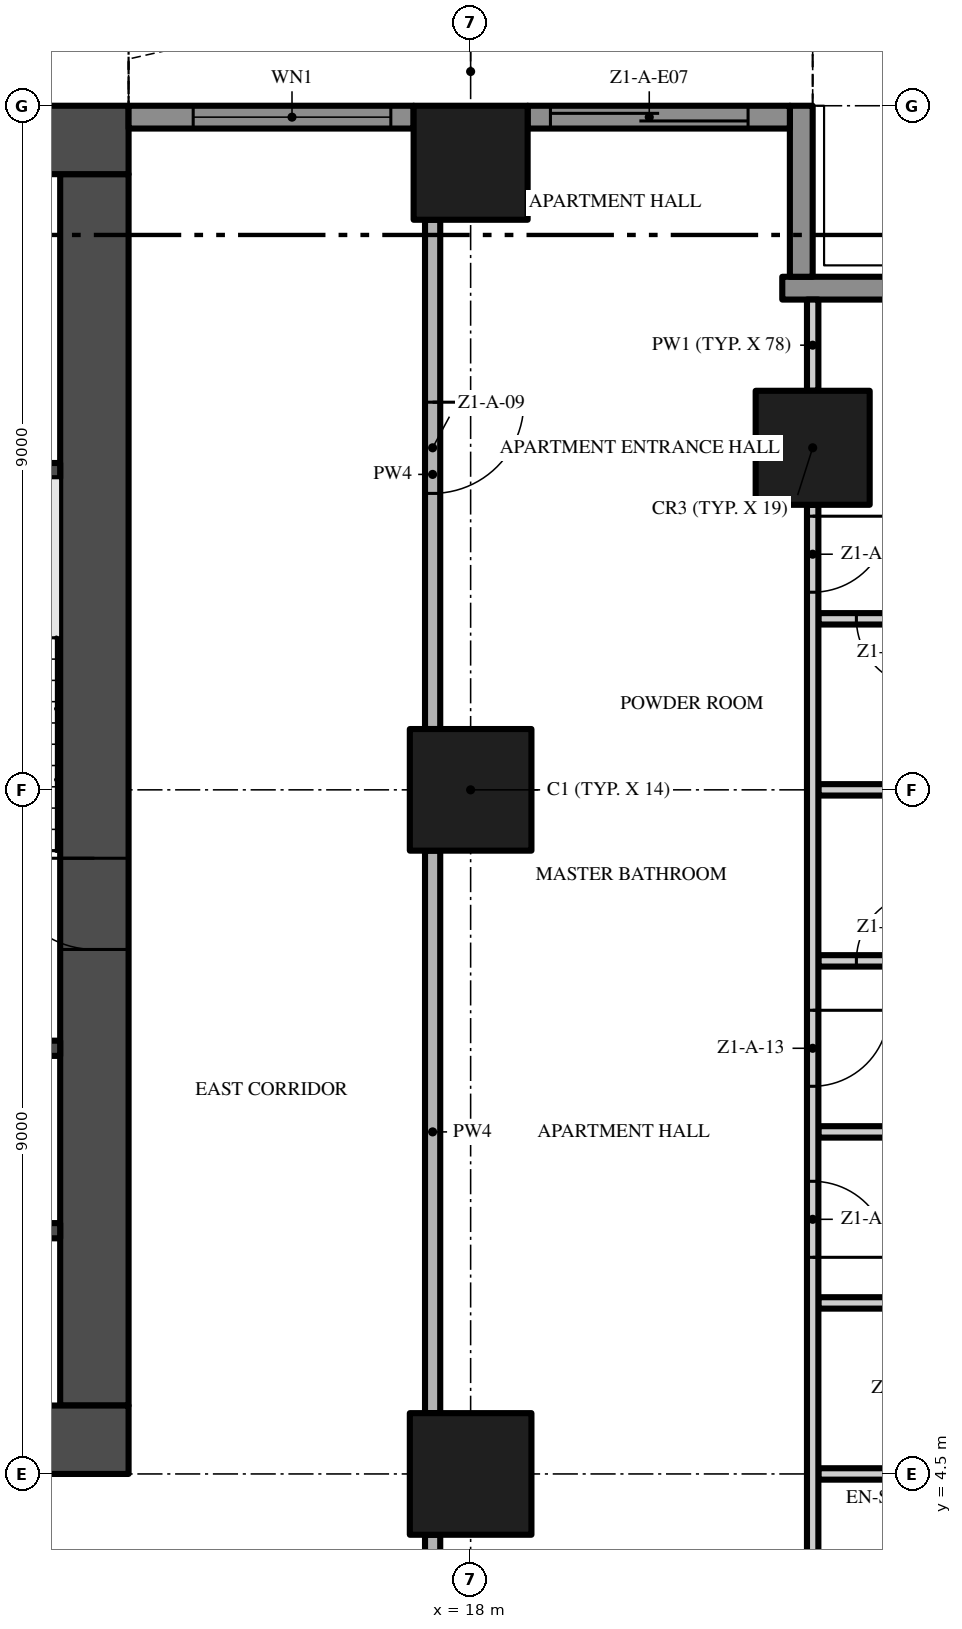
"""IFC4 building model, lengths in metres.
Left out: names, types, materials, properties, quantities, classifications, styles, units other than length and angle.
Written with IfcOpenShell. Run it as: python <this file> out.ifc"""

import sys

from ifc_helpers import new_model, si_unit, direction, frame, frame_2d, origin, origin_2d, place, context, subcontext, project, spatial, polyline, rectangle, outline, extrude, element, fill, save


model = new_model("IFC4")
c1 = context("Model", 3, precision=1e-05, world=origin(), true_north=direction((0.0, 1.0)))
c2 = subcontext(c1, "Body", "Model", "MODEL_VIEW")
j1 = project(units=[si_unit("LENGTHUNIT", "METRE"), si_unit("PLANEANGLEUNIT", "RADIAN")], contexts=[c1])
p1 = place(None, origin())
s1 = spatial("IfcSite", under=j1, at=p1, CompositionType="ELEMENT")
p2 = place(p1, origin())
s2 = spatial("IfcBuilding", under=s1, at=p2, CompositionType="ELEMENT")
p3 = place(p2, frame((0.0, 0.0, 18.8)))
s3 = spatial("IfcBuildingStorey", under=s2, at=p3, CompositionType="ELEMENT", Elevation=18.8)
p4 = place(p3, frame((-13.5, 4.95, -0.3), z_axis=(0.0, 0.0, 1.0), x_axis=(1.0, 0.0, 0.0)))
e1 = element("IfcWall", 1, at=p4, inside=s3, PredefinedType="SHEAR", context=c2, shape_type="SweptSolid", body=[
    extrude(rectangle(XDim=27.0, YDim=0.9, at=frame_2d((13.5, 0.0))), origin(), (0.0, 0.0, 1.0), 3.8),
])
p5 = place(p4, frame((12.0, 0.0, 0.3)))
e2 = element("IfcOpeningElement", 2, at=p5, cuts=e1, PredefinedType="OPENING", context=c2, shape_type="SweptSolid", body=[
    extrude(rectangle(XDim=3.0, YDim=2.4, at=frame_2d((1.5, 1.2))), frame((0.0, 0.46, 0.0), z_axis=(0.0, -1.0, 0.0), x_axis=(1.0, 0.0, 0.0)), (0.0, 0.0, 1.0), 0.92),
])
p6 = place(p4, frame((4.9, 0.0, 0.3)))
e3 = element("IfcOpeningElement", 3, at=p6, cuts=e1, PredefinedType="OPENING", context=c2, shape_type="SweptSolid", body=[
    extrude(rectangle(XDim=1.2, YDim=2.2, at=frame_2d((0.6, 1.1))), frame((0.0, 0.46, 0.0), z_axis=(0.0, -1.0, 0.0), x_axis=(1.0, 0.0, 0.0)), (0.0, 0.0, 1.0), 0.92),
])
p7 = place(p4, frame((20.75, 0.0, 0.3)))
e4 = element("IfcOpeningElement", 4, at=p7, cuts=e1, PredefinedType="OPENING", context=c2, shape_type="SweptSolid", body=[
    extrude(rectangle(XDim=1.5, YDim=2.2, at=frame_2d((0.75, 1.1))), frame((0.0, 0.46, 0.0), z_axis=(0.0, -1.0, 0.0), x_axis=(1.0, 0.0, 0.0)), (0.0, 0.0, 1.0), 0.92),
])
p8 = place(p4, frame((17.4, 0.0, 0.3)))
e5 = element("IfcOpeningElement", 5, at=p8, cuts=e1, PredefinedType="OPENING", context=c2, shape_type="SweptSolid", body=[
    extrude(rectangle(XDim=1.2, YDim=2.2, at=frame_2d((0.6, 1.1))), frame((0.0, 0.46, 0.0), z_axis=(0.0, -1.0, 0.0), x_axis=(1.0, 0.0, 0.0)), (0.0, 0.0, 1.0), 0.92),
])
p9 = place(p3, frame((13.05, 5.4, -0.3), z_axis=(0.0, 0.0, 1.0), x_axis=(0.0, 1.0, 0.0)))
e6 = element("IfcWall", 6, at=p9, inside=s3, PredefinedType="SHEAR", context=c2, shape_type="SweptSolid", body=[
    extrude(rectangle(XDim=16.2, YDim=0.9, at=frame_2d((8.1, 0.0))), origin(), (0.0, 0.0, 1.0), 3.8),
])
p10 = place(p9, frame((6.0, 0.0, 0.3)))
e7 = element("IfcOpeningElement", 7, at=p10, cuts=e6, PredefinedType="OPENING", context=c2, shape_type="SweptSolid", body=[
    extrude(rectangle(XDim=1.2, YDim=2.2, at=frame_2d((0.6, 1.1))), frame((0.0, 0.46, 0.0), z_axis=(0.0, -1.0, 0.0), x_axis=(1.0, 0.0, 0.0)), (0.0, 0.0, 1.0), 0.92),
])
p11 = place(p3, frame((13.5, 22.05, -0.3), z_axis=(0.0, 0.0, 1.0), x_axis=(-1.0, 0.0, 0.0)))
e8 = element("IfcWall", 8, at=p11, inside=s3, PredefinedType="SHEAR", context=c2, shape_type="SweptSolid", body=[
    extrude(rectangle(XDim=27.0, YDim=0.9, at=frame_2d((13.5, 0.0))), origin(), (0.0, 0.0, 1.0), 3.8),
])
p12 = place(p3, frame((18.0, 13.5, 0.0), z_axis=(0.0, 0.0, 1.0), x_axis=(1.0, 0.0, 0.0)))
e9 = element("IfcColumn", 9, at=p12, inside=s3, PredefinedType="COLUMN", context=c2, shape_type="SweptSolid", body=[
    extrude(rectangle(XDim=1.6, YDim=1.6, at=origin_2d()), origin(), (0.0, 0.0, 1.0), 3.5),
])
p13 = place(p3, frame((18.0, 21.75, 0.0), z_axis=(0.0, 0.0, 1.0), x_axis=(1.0, 0.0, 0.0)))
e10 = element("IfcColumn", 10, at=p13, inside=s3, PredefinedType="COLUMN", context=c2, shape_type="SweptSolid", body=[
    extrude(rectangle(XDim=1.5, YDim=1.5, at=origin_2d()), origin(), (0.0, 0.0, 1.0), 3.5),
])
p14 = place(p3, frame((18.0, 4.5, 0.0), z_axis=(0.0, 0.0, 1.0), x_axis=(1.0, 0.0, 0.0)))
e11 = element("IfcColumn", 11, at=p14, inside=s3, PredefinedType="COLUMN", context=c2, shape_type="SweptSolid", body=[
    extrude(rectangle(XDim=1.6, YDim=1.6, at=origin_2d()), origin(), (0.0, 0.0, 1.0), 3.5),
])
p15 = place(p3, frame((22.5, 18.0, 0.0), z_axis=(0.0, 0.0, 1.0), x_axis=(1.0, 0.0, 0.0)))
e12 = element("IfcColumn", 12, at=p15, inside=s3, PredefinedType="COLUMN", context=c2, shape_type="SweptSolid", body=[
    extrude(rectangle(XDim=1.5, YDim=1.5, at=origin_2d()), origin(), (0.0, 0.0, 1.0), 3.5),
])
p16 = place(p3, frame((22.1, 20.1, 0.0), z_axis=(0.0, 0.0, 1.0), x_axis=(1.0, 0.0, 0.0)))
e13 = element("IfcWall", 13, at=p16, inside=s3, PredefinedType="SOLIDWALL", context=c2, shape_type="SweptSolid", body=[
    extrude(rectangle(XDim=2.35, YDim=0.3, at=frame_2d((1.175, 0.0))), origin(), (0.0, 0.0, 1.0), 3.5),
])
p17 = place(p3, frame((22.35, 22.5, 0.0), z_axis=(0.0, 0.0, 1.0), x_axis=(0.0, -1.0, 0.0)))
e14 = element("IfcWall", 14, at=p17, inside=s3, PredefinedType="SOLIDWALL", context=c2, shape_type="SweptSolid", body=[
    extrude(rectangle(XDim=2.25, YDim=0.3, at=frame_2d((1.125, 0.0))), origin(), (0.0, 0.0, 1.0), 3.5),
])
p18 = place(p3, frame((18.75, 22.35, 0.0), z_axis=(0.0, 0.0, 1.0), x_axis=(1.0, 0.0, 0.0)))
e15 = element("IfcWall", 15, at=p18, inside=s3, PredefinedType="SOLIDWALL", context=c2, shape_type="SweptSolid", body=[
    extrude(rectangle(XDim=3.45, YDim=0.3, at=frame_2d((1.725, 0.0))), origin(), (0.0, 0.0, 1.0), 3.5),
])
p19 = place(p18, frame((0.3, 0.0, 0.0)))
e16 = element("IfcOpeningElement", 16, at=p19, cuts=e15, PredefinedType="OPENING", context=c2, shape_type="SweptSolid", body=[
    extrude(rectangle(XDim=2.6, YDim=2.4, at=frame_2d((1.3, 1.2))), frame((0.0, 0.16, 0.0), z_axis=(0.0, -1.0, 0.0), x_axis=(1.0, 0.0, 0.0)), (0.0, 0.0, 1.0), 0.32),
])
p20 = place(p3, frame((13.5, 22.35, 0.0), z_axis=(0.0, 0.0, 1.0), x_axis=(1.0, 0.0, 0.0)))
e17 = element("IfcWall", 17, at=p20, inside=s3, PredefinedType="SOLIDWALL", context=c2, shape_type="SweptSolid", body=[
    extrude(rectangle(XDim=3.75, YDim=0.3, at=frame_2d((1.875, 0.0))), origin(), (0.0, 0.0, 1.0), 3.5),
])
p21 = place(p20, frame((0.85, 0.0, 0.45)))
e18 = element("IfcOpeningElement", 18, at=p21, cuts=e17, PredefinedType="OPENING", context=c2, shape_type="SweptSolid", body=[
    extrude(rectangle(XDim=2.6, YDim=2.65, at=frame_2d((1.3, 1.325))), frame((0.0, 0.16, 0.0), z_axis=(0.0, -1.0, 0.0), x_axis=(1.0, 0.0, 0.0)), (0.0, 0.0, 1.0), 0.32),
])
p22 = place(p3, origin())
e19 = element("IfcWall", 19, at=p22, inside=s3, PredefinedType="USERDEFINED", context=c2, shape_type="SweptSolid", body=[
    extrude(outline(polyline([(22.5, 25.149), (21.0, 25.485), (20.625, 25.5), (19.5, 25.369), (18.0, 24.845), (16.5, 24.112), (15.0, 23.451), (13.5, 23.115), (13.555, 22.871), (15.079, 23.213), (16.605, 23.885), (18.096, 24.614), (19.556, 25.124), (20.635, 25.249), (20.967, 25.236), (22.445, 24.905), (22.5, 25.149)])), origin(), (0.0, 0.0, 1.0), 0.9),
])
for number, where, z_axis, x_axis in (
    (20, (9.65, 7.7, 0.0), (0.0, 0.0, 1.0), (1.0, 0.0, 0.0)),
    (21, (9.65, 10.1, 0.0), (0.0, 0.0, 1.0), (1.0, 0.0, 0.0)),
    (22, (9.65, 17.7, 0.0), (0.0, 0.0, 1.0), (1.0, 0.0, 0.0)),
):
    element("IfcWall", number, at=place(p3, frame(where, z_axis=z_axis, x_axis=x_axis)), inside=s3, PredefinedType="SHEAR", context=c2, shape_type="SweptSolid", body=[
        extrude(rectangle(XDim=2.95, YDim=0.2, at=frame_2d((1.475, 0.0))), origin(), (0.0, 0.0, 1.0), 3.5),
    ])
p23 = place(p3, frame((22.575, 4.5, 0.0), z_axis=(0.0, 0.0, 1.0), x_axis=(1.0, 0.0, 0.0)))
e23 = element("IfcWall", 23, at=p23, inside=s3, PredefinedType="PARTITIONING", context=c2, shape_type="SweptSolid", body=[
    extrude(rectangle(XDim=2.925, YDim=0.15, at=frame_2d((1.462, 0.0))), origin(), (0.0, 0.0, 1.0), 3.5),
])
p24 = place(p3, frame((22.575, 6.75, 0.0), z_axis=(0.0, 0.0, 1.0), x_axis=(1.0, 0.0, 0.0)))
e24 = element("IfcWall", 24, at=p24, inside=s3, PredefinedType="PARTITIONING", context=c2, shape_type="SweptSolid", body=[
    extrude(rectangle(XDim=1.875, YDim=0.15, at=frame_2d((0.938, 0.0))), origin(), (0.0, 0.0, 1.0), 3.5),
])
p25 = place(p3, frame((22.575, 9.0, 0.0), z_axis=(0.0, 0.0, 1.0), x_axis=(1.0, 0.0, 0.0)))
e25 = element("IfcWall", 25, at=p25, inside=s3, PredefinedType="PARTITIONING", context=c2, shape_type="SweptSolid", body=[
    extrude(rectangle(XDim=4.125, YDim=0.15, at=frame_2d((2.062, 0.0))), origin(), (0.0, 0.0, 1.0), 3.5),
])
p26 = place(p3, frame((22.575, 11.25, 0.0), z_axis=(0.0, 0.0, 1.0), x_axis=(1.0, 0.0, 0.0)))
e26 = element("IfcWall", 26, at=p26, inside=s3, PredefinedType="PARTITIONING", context=c2, shape_type="SweptSolid", body=[
    extrude(rectangle(XDim=1.875, YDim=0.15, at=frame_2d((0.938, 0.0))), origin(), (0.0, 0.0, 1.0), 3.5),
])
p27 = place(p26, frame((0.5, 0.0, 0.0)))
e27 = element("IfcOpeningElement", 27, at=p27, cuts=e26, PredefinedType="OPENING", context=c2, shape_type="SweptSolid", body=[
    extrude(rectangle(XDim=0.9, YDim=2.1, at=frame_2d((0.45, 1.05))), frame((0.0, 0.085, 0.0), z_axis=(0.0, -1.0, 0.0), x_axis=(1.0, 0.0, 0.0)), (0.0, 0.0, 1.0), 0.17),
])
p28 = place(p3, frame((22.575, 13.5, 0.0), z_axis=(0.0, 0.0, 1.0), x_axis=(1.0, 0.0, 0.0)))
e28 = element("IfcWall", 28, at=p28, inside=s3, PredefinedType="PARTITIONING", context=c2, shape_type="SweptSolid", body=[
    extrude(rectangle(XDim=1.875, YDim=0.15, at=frame_2d((0.938, 0.0))), origin(), (0.0, 0.0, 1.0), 3.5),
])
p29 = place(p3, frame((24.45, 15.75, 0.0), z_axis=(0.0, 0.0, 1.0), x_axis=(-1.0, 0.0, 0.0)))
e29 = element("IfcWall", 29, at=p29, inside=s3, PredefinedType="PARTITIONING", context=c2, shape_type="SweptSolid", body=[
    extrude(rectangle(XDim=1.875, YDim=0.15, at=frame_2d((0.938, 0.0))), origin(), (0.0, 0.0, 1.0), 3.5),
])
p30 = place(p29, frame((0.475, 0.0, 0.0)))
e30 = element("IfcOpeningElement", 30, at=p30, cuts=e29, PredefinedType="OPENING", context=c2, shape_type="SweptSolid", body=[
    extrude(rectangle(XDim=0.9, YDim=2.1, at=frame_2d((0.45, 1.05))), frame((0.0, 0.085, 0.0), z_axis=(0.0, -1.0, 0.0), x_axis=(1.0, 0.0, 0.0)), (0.0, 0.0, 1.0), 0.17),
])
p31 = place(p3, frame((17.5, -0.2, 0.0), z_axis=(0.0, 0.0, 1.0), x_axis=(0.0, 1.0, 0.0)))
e31 = element("IfcWall", 31, at=p31, inside=s3, PredefinedType="PARTITIONING", context=c2, shape_type="SweptSolid", body=[
    extrude(rectangle(XDim=3.9, YDim=0.2, at=frame_2d((1.95, 0.0))), origin(), (0.0, 0.0, 1.0), 3.5),
])
p32 = place(p3, frame((17.5, 5.3, 0.0), z_axis=(0.0, 0.0, 1.0), x_axis=(0.0, 1.0, 0.0)))
e32 = element("IfcWall", 32, at=p32, inside=s3, PredefinedType="PARTITIONING", context=c2, shape_type="SweptSolid", body=[
    extrude(rectangle(XDim=7.4, YDim=0.2, at=frame_2d((3.7, 0.0))), origin(), (0.0, 0.0, 1.0), 3.5),
])
p33 = place(p3, frame((17.5, 21.0, 0.0), z_axis=(0.0, 0.0, 1.0), x_axis=(0.0, -1.0, 0.0)))
e33 = element("IfcWall", 33, at=p33, inside=s3, PredefinedType="PARTITIONING", context=c2, shape_type="SweptSolid", body=[
    extrude(rectangle(XDim=6.7, YDim=0.2, at=frame_2d((3.35, 0.0))), origin(), (0.0, 0.0, 1.0), 3.5),
])
p34 = place(p33, frame((2.4, 0.0, 0.0)))
e34 = element("IfcOpeningElement", 34, at=p34, cuts=e33, PredefinedType="OPENING", context=c2, shape_type="SweptSolid", body=[
    extrude(rectangle(XDim=1.2, YDim=2.4, at=frame_2d((0.6, 1.2))), frame((0.0, 0.11, 0.0), z_axis=(0.0, -1.0, 0.0), x_axis=(1.0, 0.0, 0.0)), (0.0, 0.0, 1.0), 0.22),
])
p35 = place(p3, frame((22.5, 17.25, 0.0), z_axis=(0.0, 0.0, 1.0), x_axis=(0.0, -1.0, 0.0)))
e35 = element("IfcWall", 35, at=p35, inside=s3, PredefinedType="PARTITIONING", context=c2, shape_type="SweptSolid", body=[
    extrude(rectangle(XDim=17.15, YDim=0.15, at=frame_2d((8.575, 0.0))), origin(), (0.0, 0.0, 1.0), 3.5),
])
p36 = place(p35, frame((14.5, 0.0, 0.0)))
e36 = element("IfcOpeningElement", 36, at=p36, cuts=e35, PredefinedType="OPENING", context=c2, shape_type="SweptSolid", body=[
    extrude(rectangle(XDim=1.0, YDim=2.4, at=frame_2d((0.5, 1.2))), frame((0.0, 0.085, 0.0), z_axis=(0.0, -1.0, 0.0), x_axis=(1.0, 0.0, 0.0)), (0.0, 0.0, 1.0), 0.17),
])
p37 = place(p35, frame((8.9, 0.0, 0.0)))
e37 = element("IfcOpeningElement", 37, at=p37, cuts=e35, PredefinedType="OPENING", context=c2, shape_type="SweptSolid", body=[
    extrude(rectangle(XDim=1.0, YDim=2.4, at=frame_2d((0.5, 1.2))), frame((0.0, 0.085, 0.0), z_axis=(0.0, -1.0, 0.0), x_axis=(1.0, 0.0, 0.0)), (0.0, 0.0, 1.0), 0.17),
])
p38 = place(p35, frame((6.65, 0.0, 0.0)))
e38 = element("IfcOpeningElement", 38, at=p38, cuts=e35, PredefinedType="OPENING", context=c2, shape_type="SweptSolid", body=[
    extrude(rectangle(XDim=1.0, YDim=2.4, at=frame_2d((0.5, 1.2))), frame((0.0, 0.085, 0.0), z_axis=(0.0, -1.0, 0.0), x_axis=(1.0, 0.0, 0.0)), (0.0, 0.0, 1.0), 0.17),
])
p39 = place(p35, frame((0.15, 0.0, 0.0)))
e39 = element("IfcOpeningElement", 39, at=p39, cuts=e35, PredefinedType="OPENING", context=c2, shape_type="SweptSolid", body=[
    extrude(rectangle(XDim=1.0, YDim=2.4, at=frame_2d((0.5, 1.2))), frame((0.0, 0.085, 0.0), z_axis=(0.0, -1.0, 0.0), x_axis=(1.0, 0.0, 0.0)), (0.0, 0.0, 1.0), 0.17),
])
p40 = place(p3, frame((22.5, 18.75, 0.0), z_axis=(0.0, 0.0, 1.0), x_axis=(0.0, 1.0, 0.0)))
e40 = element("IfcWall", 40, at=p40, inside=s3, PredefinedType="PARTITIONING", context=c2, shape_type="SweptSolid", body=[
    extrude(rectangle(XDim=1.2, YDim=0.15, at=frame_2d((0.6, 0.0))), origin(), (0.0, 0.0, 1.0), 3.5),
])
p41 = place(p19, origin())
e41 = element("IfcDoor", 41, at=p41, inside=s3, OperationType="SINGLE_SWING_LEFT", PredefinedType="DOOR", context=c2, shape_type="SweptSolid", body=[
    extrude(rectangle(XDim=2.6, YDim=2.4, at=frame_2d((1.3, 1.2))), frame((0.0, 0.025, 0.0), z_axis=(0.0, -1.0, 0.0), x_axis=(1.0, 0.0, 0.0)), (0.0, 0.0, 1.0), 0.05),
])
fill(e16, e41)
p42 = place(p21, origin())
e42 = element("IfcWindow", 42, at=p42, inside=s3, PartitioningType="SINGLE_PANEL", PredefinedType="WINDOW", context=c2, shape_type="SweptSolid", body=[
    extrude(rectangle(XDim=2.6, YDim=2.65, at=frame_2d((1.3, 1.325))), frame((0.0, 0.03, 0.0), z_axis=(0.0, -1.0, 0.0), x_axis=(1.0, 0.0, 0.0)), (0.0, 0.0, 1.0), 0.06),
])
fill(e18, e42)
p43 = place(p10, frame((1.2, 0.0, 0.0), z_axis=(0.0, 0.0, 1.0), x_axis=(-1.0, 0.0, 0.0)))
e43 = element("IfcDoor", 43, at=p43, inside=s3, OperationType="SINGLE_SWING_LEFT", PredefinedType="DOOR", context=c2, shape_type="SweptSolid", body=[
    extrude(rectangle(XDim=1.2, YDim=2.2, at=frame_2d((0.6, 1.1))), frame((0.0, 0.025, 0.0), z_axis=(0.0, -1.0, 0.0), x_axis=(1.0, 0.0, 0.0)), (0.0, 0.0, 1.0), 0.05),
])
fill(e7, e43)
p44 = place(p34, origin())
e44 = element("IfcDoor", 44, at=p44, inside=s3, OperationType="SINGLE_SWING_LEFT", PredefinedType="DOOR", context=c2, shape_type="SweptSolid", body=[
    extrude(rectangle(XDim=1.2, YDim=2.4, at=frame_2d((0.6, 1.2))), frame((0.0, 0.025, 0.0), z_axis=(0.0, -1.0, 0.0), x_axis=(1.0, 0.0, 0.0)), (0.0, 0.0, 1.0), 0.05),
])
fill(e34, e44)
p45 = place(p37, origin())
e45 = element("IfcDoor", 45, at=p45, inside=s3, OperationType="SINGLE_SWING_RIGHT", PredefinedType="DOOR", context=c2, shape_type="SweptSolid", body=[
    extrude(rectangle(XDim=1.0, YDim=2.4, at=frame_2d((0.5, 1.2))), frame((0.0, 0.025, 0.0), z_axis=(0.0, -1.0, 0.0), x_axis=(1.0, 0.0, 0.0)), (0.0, 0.0, 1.0), 0.05),
])
fill(e37, e45)
p46 = place(p38, origin())
e46 = element("IfcDoor", 46, at=p46, inside=s3, OperationType="SINGLE_SWING_LEFT", PredefinedType="DOOR", context=c2, shape_type="SweptSolid", body=[
    extrude(rectangle(XDim=1.0, YDim=2.4, at=frame_2d((0.5, 1.2))), frame((0.0, 0.025, 0.0), z_axis=(0.0, -1.0, 0.0), x_axis=(1.0, 0.0, 0.0)), (0.0, 0.0, 1.0), 0.05),
])
fill(e38, e46)
p47 = place(p27, origin())
e47 = element("IfcDoor", 47, at=p47, inside=s3, OperationType="SINGLE_SWING_RIGHT", PredefinedType="DOOR", context=c2, shape_type="SweptSolid", body=[
    extrude(rectangle(XDim=0.9, YDim=2.1, at=frame_2d((0.45, 1.05))), frame((0.0, 0.025, 0.0), z_axis=(0.0, -1.0, 0.0), x_axis=(1.0, 0.0, 0.0)), (0.0, 0.0, 1.0), 0.05),
])
fill(e27, e47)
p48 = place(p39, origin())
e48 = element("IfcDoor", 48, at=p48, inside=s3, OperationType="SINGLE_SWING_LEFT", PredefinedType="DOOR", context=c2, shape_type="SweptSolid", body=[
    extrude(rectangle(XDim=1.0, YDim=2.4, at=frame_2d((0.5, 1.2))), frame((0.0, 0.025, 0.0), z_axis=(0.0, -1.0, 0.0), x_axis=(1.0, 0.0, 0.0)), (0.0, 0.0, 1.0), 0.05),
])
fill(e39, e48)
p49 = place(p30, origin())
e49 = element("IfcDoor", 49, at=p49, inside=s3, OperationType="SINGLE_SWING_LEFT", PredefinedType="DOOR", context=c2, shape_type="SweptSolid", body=[
    extrude(rectangle(XDim=0.9, YDim=2.1, at=frame_2d((0.45, 1.05))), frame((0.0, 0.025, 0.0), z_axis=(0.0, -1.0, 0.0), x_axis=(1.0, 0.0, 0.0)), (0.0, 0.0, 1.0), 0.05),
])
fill(e30, e49)
save(model, sys.argv[1])
